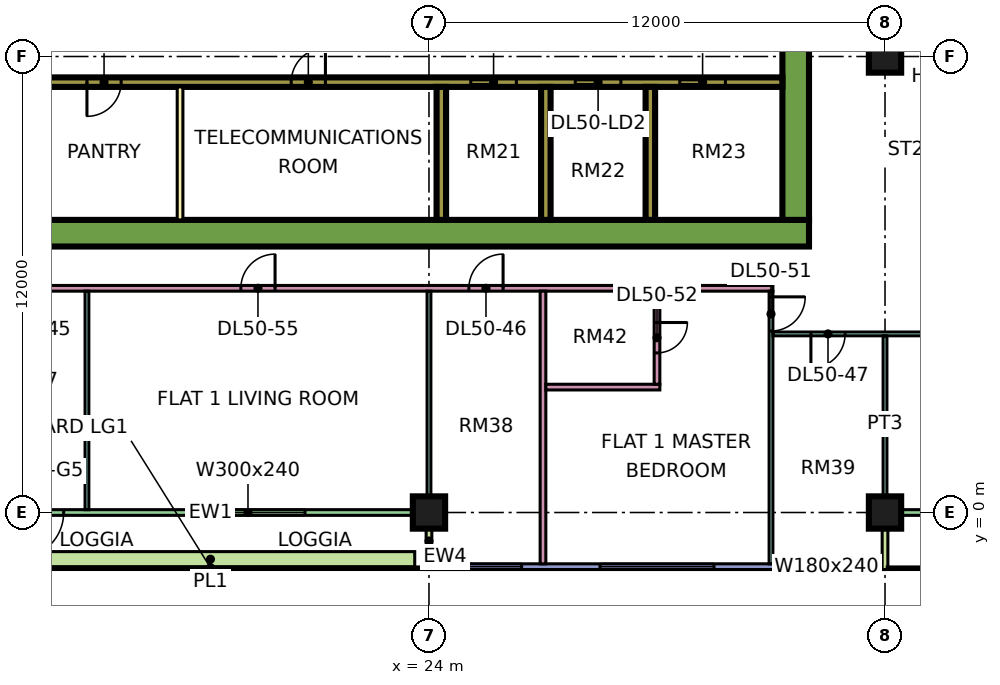
"""IFC4 building model, lengths in metres.
Left out: names, types, materials, properties, quantities, classifications, styles, units other than length and angle.
Written with IfcOpenShell. Run it as: python <this file> out.ifc"""

import sys

from ifc_helpers import new_model, si_unit, direction, frame, frame_2d, origin, origin_2d, place, context, subcontext, project, spatial, rectangle, extrude, element, fill, save


model = new_model("IFC4")
c1 = context("Model", 3, precision=1e-05, world=origin(), true_north=direction((0.0, 1.0)))
c2 = subcontext(c1, "Body", "Model", "MODEL_VIEW")
j1 = project(units=[si_unit("LENGTHUNIT", "METRE"), si_unit("PLANEANGLEUNIT", "RADIAN")], contexts=[c1])
p1 = place(None, origin())
s1 = spatial("IfcSite", under=j1, at=p1, CompositionType="ELEMENT")
p2 = place(p1, origin())
s2 = spatial("IfcBuilding", under=s1, at=p2, CompositionType="ELEMENT")
p3 = place(p2, frame((0.0, 0.0, 215.4)))
s3 = spatial("IfcBuildingStorey", under=s2, at=p3, CompositionType="ELEMENT", Elevation=215.4)
for number, where, z_axis, x_axis in (
    (1, (24.0, 0.0, 0.0), (0.0, 0.0, 1.0), (1.0, 0.0, 0.0)),
    (2, (36.0, 0.0, 0.0), (0.0, 0.0, 1.0), (1.0, 0.0, 0.0)),
    (3, (36.0, 12.0, 0.0), (0.0, 0.0, 1.0), (1.0, 0.0, 0.0)),
):
    element("IfcColumn", number, at=place(p3, frame(where, z_axis=z_axis, x_axis=x_axis)), inside=s3, PredefinedType="COLUMN", context=c2, shape_type="SweptSolid", body=[
        extrude(rectangle(XDim=0.85, YDim=0.85, at=origin_2d()), origin(), (0.0, 0.0, 1.0), 3.75),
    ])
p4 = place(p3, frame((9.0, 7.35, 0.0), z_axis=(0.0, 0.0, 1.0), x_axis=(1.0, 0.0, 0.0)))
e4 = element("IfcWall", 4, at=p4, inside=s3, PredefinedType="SHEAR", context=c2, shape_type="SweptSolid", body=[
    extrude(rectangle(XDim=25.0, YDim=0.7, at=frame_2d((12.5, 0.0))), origin(), (0.0, 0.0, 1.0), 3.75),
])
p5 = place(p3, frame((33.65, 7.7, 0.0), z_axis=(0.0, 0.0, 1.0), x_axis=(0.0, 1.0, 0.0)))
e5 = element("IfcWall", 5, at=p5, inside=s3, PredefinedType="SHEAR", context=c2, shape_type="SweptSolid", body=[
    extrude(rectangle(XDim=11.6, YDim=0.7, at=frame_2d((5.8, 0.0))), origin(), (0.0, 0.0, 1.0), 3.75),
])
p6 = place(p5, frame((5.5, 0.0, 0.0)))
e6 = element("IfcOpeningElement", 6, at=p6, cuts=e5, PredefinedType="OPENING", context=c2, shape_type="SweptSolid", body=[
    extrude(rectangle(XDim=1.8, YDim=2.4, at=frame_2d((0.9, 1.2))), frame((0.0, 0.36, 0.0), z_axis=(0.0, -1.0, 0.0), x_axis=(1.0, 0.0, 0.0)), (0.0, 0.0, 1.0), 0.72),
])
p7 = place(p3, frame((13.45, 11.325, 0.0), z_axis=(0.0, 0.0, 1.0), x_axis=(1.0, 0.0, 0.0)))
e7 = element("IfcWall", 7, at=p7, inside=s3, PredefinedType="SHEAR", context=c2, shape_type="SweptSolid", body=[
    extrude(rectangle(XDim=19.85, YDim=0.25, at=frame_2d((9.925, 0.0))), origin(), (0.0, 0.0, 1.0), 3.75),
])
p8 = place(p7, frame((11.65, 0.0, 0.0)))
e8 = element("IfcOpeningElement", 8, at=p8, cuts=e7, PredefinedType="OPENING", context=c2, shape_type="SweptSolid", body=[
    extrude(rectangle(XDim=1.2, YDim=2.2, at=frame_2d((0.6, 1.1))), frame((0.0, 0.135, 0.0), z_axis=(0.0, -1.0, 0.0), x_axis=(1.0, 0.0, 0.0)), (0.0, 0.0, 1.0), 0.27),
])
p9 = place(p7, frame((14.4, 0.0, 0.0)))
e9 = element("IfcOpeningElement", 9, at=p9, cuts=e7, PredefinedType="OPENING", context=c2, shape_type="SweptSolid", body=[
    extrude(rectangle(XDim=1.2, YDim=2.2, at=frame_2d((0.6, 1.1))), frame((0.0, 0.135, 0.0), z_axis=(0.0, -1.0, 0.0), x_axis=(1.0, 0.0, 0.0)), (0.0, 0.0, 1.0), 0.27),
])
p10 = place(p7, frame((17.15, 0.0, 0.0)))
e10 = element("IfcOpeningElement", 10, at=p10, cuts=e7, PredefinedType="OPENING", context=c2, shape_type="SweptSolid", body=[
    extrude(rectangle(XDim=1.2, YDim=2.2, at=frame_2d((0.6, 1.1))), frame((0.0, 0.135, 0.0), z_axis=(0.0, -1.0, 0.0), x_axis=(1.0, 0.0, 0.0)), (0.0, 0.0, 1.0), 0.27),
])
p11 = place(p7, frame((1.55, 0.0, 0.0)))
e11 = element("IfcOpeningElement", 11, at=p11, cuts=e7, PredefinedType="OPENING", context=c2, shape_type="SweptSolid", body=[
    extrude(rectangle(XDim=0.9, YDim=2.1, at=frame_2d((0.45, 1.05))), frame((0.0, 0.135, 0.0), z_axis=(0.0, -1.0, 0.0), x_axis=(1.0, 0.0, 0.0)), (0.0, 0.0, 1.0), 0.27),
])
p12 = place(p7, frame((6.925, 0.0, 0.0)))
e12 = element("IfcOpeningElement", 12, at=p12, cuts=e7, PredefinedType="OPENING", context=c2, shape_type="SweptSolid", body=[
    extrude(rectangle(XDim=0.9, YDim=2.1, at=frame_2d((0.45, 1.05))), frame((0.0, 0.135, 0.0), z_axis=(0.0, -1.0, 0.0), x_axis=(1.0, 0.0, 0.0)), (0.0, 0.0, 1.0), 0.27),
])
for number, where, z_axis, x_axis in (
    (13, (24.325, 7.7, 0.0), (0.0, 0.0, 1.0), (0.0, 1.0, 0.0)),
    (14, (27.075, 7.7, 0.0), (0.0, 0.0, 1.0), (0.0, 1.0, 0.0)),
    (15, (29.825, 7.7, 0.0), (0.0, 0.0, 1.0), (0.0, 1.0, 0.0)),
):
    element("IfcWall", number, at=place(p3, frame(where, z_axis=z_axis, x_axis=x_axis)), inside=s3, PredefinedType="SHEAR", context=c2, shape_type="SweptSolid", body=[
        extrude(rectangle(XDim=3.5, YDim=0.25, at=frame_2d((1.75, 0.0))), origin(), (0.0, 0.0, 1.0), 3.75),
    ])
p13 = place(p3, frame((12.575, 0.0, 0.0), z_axis=(0.0, 0.0, 1.0), x_axis=(1.0, 0.0, 0.0)))
e16 = element("IfcWall", 16, at=p13, inside=s3, PredefinedType="SOLIDWALL", context=c2, shape_type="SweptSolid", body=[
    extrude(rectangle(XDim=11.35, YDim=0.15, at=frame_2d((5.675, 0.0))), origin(), (0.0, 0.0, 1.0), 3.35),
])
p14 = place(p13, frame((0.613, 0.0, 0.0)))
e17 = element("IfcOpeningElement", 17, at=p14, cuts=e16, PredefinedType="OPENING", context=c2, shape_type="SweptSolid", body=[
    extrude(rectangle(XDim=1.2, YDim=2.4, at=frame_2d((0.6, 1.2))), frame((0.0, 0.085, 0.0), z_axis=(0.0, -1.0, 0.0), x_axis=(1.0, 0.0, 0.0)), (0.0, 0.0, 1.0), 0.17),
])
p15 = place(p13, frame((5.163, 0.0, 0.45)))
e18 = element("IfcOpeningElement", 18, at=p15, cuts=e16, PredefinedType="OPENING", context=c2, shape_type="SweptSolid", body=[
    extrude(rectangle(XDim=3.0, YDim=2.4, at=frame_2d((1.5, 1.2))), frame((0.0, 0.085, 0.0), z_axis=(0.0, -1.0, 0.0), x_axis=(1.0, 0.0, 0.0)), (0.0, 0.0, 1.0), 0.17),
])
p16 = place(p3, frame((24.0, -1.5, 0.0), z_axis=(0.0, 0.0, 1.0), x_axis=(0.0, 1.0, 0.0)))
e19 = element("IfcWall", 19, at=p16, inside=s3, PredefinedType="SOLIDWALL", context=c2, shape_type="SweptSolid", body=[
    extrude(rectangle(XDim=1.5, YDim=0.15, at=frame_2d((0.75, 0.0))), origin(), (0.0, 0.0, 1.0), 3.35),
])
p17 = place(p3, frame((24.075, -1.425, 0.0), z_axis=(0.0, 0.0, 1.0), x_axis=(1.0, 0.0, 0.0)))
e20 = element("IfcWall", 20, at=p17, inside=s3, PredefinedType="SOLIDWALL", context=c2, shape_type="SweptSolid", body=[
    extrude(rectangle(XDim=11.85, YDim=0.15, at=frame_2d((5.925, 0.0))), origin(), (0.0, 0.0, 1.0), 3.35),
])
p18 = place(p17, frame((0.562, 0.0, 0.45)))
e21 = element("IfcOpeningElement", 21, at=p18, cuts=e20, PredefinedType="OPENING", context=c2, shape_type="SweptSolid", body=[
    extrude(rectangle(XDim=1.8, YDim=2.4, at=frame_2d((0.9, 1.2))), frame((0.0, 0.085, 0.0), z_axis=(0.0, -1.0, 0.0), x_axis=(1.0, 0.0, 0.0)), (0.0, 0.0, 1.0), 0.17),
])
p19 = place(p17, frame((4.425, 0.0, 0.45)))
e22 = element("IfcOpeningElement", 22, at=p19, cuts=e20, PredefinedType="OPENING", context=c2, shape_type="SweptSolid", body=[
    extrude(rectangle(XDim=3.0, YDim=2.4, at=frame_2d((1.5, 1.2))), frame((0.0, 0.085, 0.0), z_axis=(0.0, -1.0, 0.0), x_axis=(1.0, 0.0, 0.0)), (0.0, 0.0, 1.0), 0.17),
])
p20 = place(p17, frame((9.488, 0.0, 0.45)))
e23 = element("IfcOpeningElement", 23, at=p20, cuts=e20, PredefinedType="OPENING", context=c2, shape_type="SweptSolid", body=[
    extrude(rectangle(XDim=1.8, YDim=2.4, at=frame_2d((0.9, 1.2))), frame((0.0, 0.085, 0.0), z_axis=(0.0, -1.0, 0.0), x_axis=(1.0, 0.0, 0.0)), (0.0, 0.0, 1.0), 0.17),
])
p21 = place(p3, frame((36.075, 0.0, 0.0), z_axis=(0.0, 0.0, 1.0), x_axis=(1.0, 0.0, 0.0)))
e24 = element("IfcWall", 24, at=p21, inside=s3, PredefinedType="SOLIDWALL", context=c2, shape_type="SweptSolid", body=[
    extrude(rectangle(XDim=11.85, YDim=0.15, at=frame_2d((5.925, 0.0))), origin(), (0.0, 0.0, 1.0), 3.35),
])
p22 = place(p21, frame((3.525, 0.0, 0.0)))
e25 = element("IfcOpeningElement", 25, at=p22, cuts=e24, PredefinedType="OPENING", context=c2, shape_type="SweptSolid", body=[
    extrude(rectangle(XDim=1.8, YDim=2.4, at=frame_2d((0.9, 1.2))), frame((0.0, 0.085, 0.0), z_axis=(0.0, -1.0, 0.0), x_axis=(1.0, 0.0, 0.0)), (0.0, 0.0, 1.0), 0.17),
])
p23 = place(p21, frame((10.05, 0.0, 0.45)))
e26 = element("IfcOpeningElement", 26, at=p23, cuts=e24, PredefinedType="OPENING", context=c2, shape_type="SweptSolid", body=[
    extrude(rectangle(XDim=1.2, YDim=2.4, at=frame_2d((0.6, 1.2))), frame((0.0, 0.085, 0.0), z_axis=(0.0, -1.0, 0.0), x_axis=(1.0, 0.0, 0.0)), (0.0, 0.0, 1.0), 0.17),
])
p24 = place(p3, frame((36.0, -1.5, 0.0), z_axis=(0.0, 0.0, 1.0), x_axis=(0.0, 1.0, 0.0)))
e27 = element("IfcWall", 27, at=p24, inside=s3, PredefinedType="SOLIDWALL", context=c2, shape_type="SweptSolid", body=[
    extrude(rectangle(XDim=1.5, YDim=0.15, at=frame_2d((0.75, 0.0))), origin(), (0.0, 0.0, 1.0), 3.35),
])
p25 = place(p3, frame((12.875, -1.229, 0.0), z_axis=(0.0, 0.0, 1.0), x_axis=(1.0, 0.0, 0.0)))
e28 = element("IfcWall", 28, at=p25, inside=s3, PredefinedType="SOLIDWALL", context=c2, shape_type="SweptSolid", body=[
    extrude(rectangle(XDim=10.75, YDim=0.4, at=frame_2d((5.375, 0.0))), origin(), (0.0, 0.0, 1.0), 0.7),
])
p26 = place(p3, frame((17.45, 7.7, 0.0), z_axis=(0.0, 0.0, 1.0), x_axis=(0.0, 1.0, 0.0)))
e29 = element("IfcWall", 29, at=p26, inside=s3, PredefinedType="PARTITIONING", context=c2, shape_type="SweptSolid", body=[
    extrude(rectangle(XDim=3.5, YDim=0.15, at=frame_2d((1.75, 0.0))), origin(), (0.0, 0.0, 1.0), 3.35),
])
p27 = place(p3, frame((11.95, 5.9, 0.0), z_axis=(0.0, 0.0, 1.0), x_axis=(1.0, 0.0, 0.0)))
e30 = element("IfcWall", 30, at=p27, inside=s3, PredefinedType="PARTITIONING", context=c2, shape_type="SweptSolid", body=[
    extrude(rectangle(XDim=21.1, YDim=0.15, at=frame_2d((10.55, 0.0))), origin(), (0.0, 0.0, 1.0), 3.35),
])
p28 = place(p27, frame((1.1, 0.0, 0.0)))
e31 = element("IfcOpeningElement", 31, at=p28, cuts=e30, PredefinedType="OPENING", context=c2, shape_type="SweptSolid", body=[
    extrude(rectangle(XDim=0.9, YDim=2.1, at=frame_2d((0.45, 1.05))), frame((0.0, 0.085, 0.0), z_axis=(0.0, -1.0, 0.0), x_axis=(1.0, 0.0, 0.0)), (0.0, 0.0, 1.0), 0.17),
])
p29 = place(p27, frame((13.1, 0.0, 0.0)))
e32 = element("IfcOpeningElement", 32, at=p29, cuts=e30, PredefinedType="OPENING", context=c2, shape_type="SweptSolid", body=[
    extrude(rectangle(XDim=0.9, YDim=2.1, at=frame_2d((0.45, 1.05))), frame((0.0, 0.085, 0.0), z_axis=(0.0, -1.0, 0.0), x_axis=(1.0, 0.0, 0.0)), (0.0, 0.0, 1.0), 0.17),
])
p30 = place(p27, frame((7.1, 0.0, 0.0)))
e33 = element("IfcOpeningElement", 33, at=p30, cuts=e30, PredefinedType="OPENING", context=c2, shape_type="SweptSolid", body=[
    extrude(rectangle(XDim=0.9, YDim=2.1, at=frame_2d((0.45, 1.05))), frame((0.0, 0.085, 0.0), z_axis=(0.0, -1.0, 0.0), x_axis=(1.0, 0.0, 0.0)), (0.0, 0.0, 1.0), 0.17),
])
p31 = place(p3, frame((15.0, 0.074, 0.0), z_axis=(0.0, 0.0, 1.0), x_axis=(0.0, 1.0, 0.0)))
e34 = element("IfcWall", 34, at=p31, inside=s3, PredefinedType="PARTITIONING", context=c2, shape_type="SweptSolid", body=[
    extrude(rectangle(XDim=5.751, YDim=0.1, at=frame_2d((2.875, 0.0))), origin(), (0.0, 0.0, 1.0), 3.35),
])
p32 = place(p3, frame((24.0, 0.0, 0.0), z_axis=(0.0, 0.0, 1.0), x_axis=(0.0, 1.0, 0.0)))
e35 = element("IfcWall", 35, at=p32, inside=s3, PredefinedType="PARTITIONING", context=c2, shape_type="SweptSolid", body=[
    extrude(rectangle(XDim=5.825, YDim=0.1, at=frame_2d((2.913, 0.0))), origin(), (0.0, 0.0, 1.0), 3.35),
])
p33 = place(p3, frame((27.0, -1.351, 0.0), z_axis=(0.0, 0.0, 1.0), x_axis=(0.0, 1.0, 0.0)))
e36 = element("IfcWall", 36, at=p33, inside=s3, PredefinedType="PARTITIONING", context=c2, shape_type="SweptSolid", body=[
    extrude(rectangle(XDim=7.176, YDim=0.15, at=frame_2d((3.588, 0.0))), origin(), (0.0, 0.0, 1.0), 3.35),
])
p34 = place(p3, frame((27.075, 3.3, 0.0), z_axis=(0.0, 0.0, 1.0), x_axis=(1.0, 0.0, 0.0)))
e37 = element("IfcWall", 37, at=p34, inside=s3, PredefinedType="PARTITIONING", context=c2, shape_type="SweptSolid", body=[
    extrude(rectangle(XDim=3.0, YDim=0.15, at=frame_2d((1.5, 0.0))), origin(), (0.0, 0.0, 1.0), 3.35),
])
p35 = place(p3, frame((30.0, 3.375, 0.0), z_axis=(0.0, 0.0, 1.0), x_axis=(0.0, 1.0, 0.0)))
e38 = element("IfcWall", 38, at=p35, inside=s3, PredefinedType="PARTITIONING", context=c2, shape_type="SweptSolid", body=[
    extrude(rectangle(XDim=2.45, YDim=0.15, at=frame_2d((1.225, 0.0))), origin(), (0.0, 0.0, 1.0), 3.35),
])
p36 = place(p35, frame((0.825, 0.0, 0.0)))
e39 = element("IfcOpeningElement", 39, at=p36, cuts=e38, PredefinedType="OPENING", context=c2, shape_type="SweptSolid", body=[
    extrude(rectangle(XDim=0.8, YDim=2.1, at=frame_2d((0.4, 1.05))), frame((0.0, 0.085, 0.0), z_axis=(0.0, -1.0, 0.0), x_axis=(1.0, 0.0, 0.0)), (0.0, 0.0, 1.0), 0.17),
])
p37 = place(p3, frame((33.0, -1.351, 0.0), z_axis=(0.0, 0.0, 1.0), x_axis=(0.0, 1.0, 0.0)))
e40 = element("IfcWall", 40, at=p37, inside=s3, PredefinedType="PARTITIONING", context=c2, shape_type="SweptSolid", body=[
    extrude(rectangle(XDim=7.176, YDim=0.1, at=frame_2d((3.588, 0.0))), origin(), (0.0, 0.0, 1.0), 3.35),
])
p38 = place(p37, frame((6.126, 0.0, 0.0)))
e41 = element("IfcOpeningElement", 41, at=p38, cuts=e40, PredefinedType="OPENING", context=c2, shape_type="SweptSolid", body=[
    extrude(rectangle(XDim=0.9, YDim=2.1, at=frame_2d((0.45, 1.05))), frame((0.0, 0.06, 0.0), z_axis=(0.0, -1.0, 0.0), x_axis=(1.0, 0.0, 0.0)), (0.0, 0.0, 1.0), 0.12),
])
p39 = place(p3, frame((33.05, 4.7, 0.0), z_axis=(0.0, 0.0, 1.0), x_axis=(1.0, 0.0, 0.0)))
e42 = element("IfcWall", 42, at=p39, inside=s3, PredefinedType="PARTITIONING", context=c2, shape_type="SweptSolid", body=[
    extrude(rectangle(XDim=14.85, YDim=0.1, at=frame_2d((7.425, 0.0))), origin(), (0.0, 0.0, 1.0), 3.35),
])
p40 = place(p39, frame((1.0, 0.0, 0.0)))
e43 = element("IfcOpeningElement", 43, at=p40, cuts=e42, PredefinedType="OPENING", context=c2, shape_type="SweptSolid", body=[
    extrude(rectangle(XDim=0.9, YDim=2.1, at=frame_2d((0.45, 1.05))), frame((0.0, 0.06, 0.0), z_axis=(0.0, -1.0, 0.0), x_axis=(1.0, 0.0, 0.0)), (0.0, 0.0, 1.0), 0.12),
])
p41 = place(p39, frame((13.0, 0.0, 0.0)))
e44 = element("IfcOpeningElement", 44, at=p41, cuts=e42, PredefinedType="OPENING", context=c2, shape_type="SweptSolid", body=[
    extrude(rectangle(XDim=0.9, YDim=2.1, at=frame_2d((0.45, 1.05))), frame((0.0, 0.06, 0.0), z_axis=(0.0, -1.0, 0.0), x_axis=(1.0, 0.0, 0.0)), (0.0, 0.0, 1.0), 0.12),
])
p42 = place(p39, frame((7.0, 0.0, 0.0)))
e45 = element("IfcOpeningElement", 45, at=p42, cuts=e42, PredefinedType="OPENING", context=c2, shape_type="SweptSolid", body=[
    extrude(rectangle(XDim=0.9, YDim=2.1, at=frame_2d((0.45, 1.05))), frame((0.0, 0.06, 0.0), z_axis=(0.0, -1.0, 0.0), x_axis=(1.0, 0.0, 0.0)), (0.0, 0.0, 1.0), 0.12),
])
p43 = place(p3, frame((36.0, 0.0, 0.0), z_axis=(0.0, 0.0, 1.0), x_axis=(0.0, 1.0, 0.0)))
e46 = element("IfcWall", 46, at=p43, inside=s3, PredefinedType="PARTITIONING", context=c2, shape_type="SweptSolid", body=[
    extrude(rectangle(XDim=4.65, YDim=0.1, at=frame_2d((2.325, 0.0))), origin(), (0.0, 0.0, 1.0), 3.35),
])
p44 = place(p14, frame((1.2, 0.0, 0.0), z_axis=(0.0, 0.0, 1.0), x_axis=(-1.0, 0.0, 0.0)))
e47 = element("IfcDoor", 47, at=p44, inside=s3, OperationType="DOUBLE_DOOR_SINGLE_SWING", PredefinedType="DOOR", context=c2, shape_type="SweptSolid", body=[
    extrude(rectangle(XDim=1.2, YDim=2.4, at=frame_2d((0.6, 1.2))), frame((0.0, 0.025, 0.0), z_axis=(0.0, -1.0, 0.0), x_axis=(1.0, 0.0, 0.0)), (0.0, 0.0, 1.0), 0.05),
])
fill(e17, e47)
p45 = place(p15, origin())
e48 = element("IfcWindow", 48, at=p45, inside=s3, PartitioningType="SINGLE_PANEL", PredefinedType="WINDOW", context=c2, shape_type="SweptSolid", body=[
    extrude(rectangle(XDim=3.0, YDim=2.4, at=frame_2d((1.5, 1.2))), frame((0.0, 0.03, 0.0), z_axis=(0.0, -1.0, 0.0), x_axis=(1.0, 0.0, 0.0)), (0.0, 0.0, 1.0), 0.06),
])
fill(e18, e48)
p46 = place(p18, origin())
e49 = element("IfcWindow", 49, at=p46, inside=s3, PartitioningType="SINGLE_PANEL", PredefinedType="WINDOW", context=c2, shape_type="SweptSolid", body=[
    extrude(rectangle(XDim=1.8, YDim=2.4, at=frame_2d((0.9, 1.2))), frame((0.0, 0.03, 0.0), z_axis=(0.0, -1.0, 0.0), x_axis=(1.0, 0.0, 0.0)), (0.0, 0.0, 1.0), 0.06),
])
fill(e21, e49)
p47 = place(p19, origin())
e50 = element("IfcWindow", 50, at=p47, inside=s3, PartitioningType="SINGLE_PANEL", PredefinedType="WINDOW", context=c2, shape_type="SweptSolid", body=[
    extrude(rectangle(XDim=3.0, YDim=2.4, at=frame_2d((1.5, 1.2))), frame((0.0, 0.03, 0.0), z_axis=(0.0, -1.0, 0.0), x_axis=(1.0, 0.0, 0.0)), (0.0, 0.0, 1.0), 0.06),
])
fill(e22, e50)
p48 = place(p20, origin())
e51 = element("IfcWindow", 51, at=p48, inside=s3, PartitioningType="SINGLE_PANEL", PredefinedType="WINDOW", context=c2, shape_type="SweptSolid", body=[
    extrude(rectangle(XDim=1.8, YDim=2.4, at=frame_2d((0.9, 1.2))), frame((0.0, 0.03, 0.0), z_axis=(0.0, -1.0, 0.0), x_axis=(1.0, 0.0, 0.0)), (0.0, 0.0, 1.0), 0.06),
])
fill(e23, e51)
p49 = place(p8, origin())
e52 = element("IfcDoor", 52, at=p49, inside=s3, OperationType="DOUBLE_DOOR_SLIDING", PredefinedType="DOOR", context=c2, shape_type="SweptSolid", body=[
    extrude(rectangle(XDim=1.2, YDim=2.2, at=frame_2d((0.6, 1.1))), frame((0.0, 0.025, 0.0), z_axis=(0.0, -1.0, 0.0), x_axis=(1.0, 0.0, 0.0)), (0.0, 0.0, 1.0), 0.05),
])
fill(e8, e52)
p50 = place(p9, origin())
e53 = element("IfcDoor", 53, at=p50, inside=s3, OperationType="DOUBLE_DOOR_SLIDING", PredefinedType="DOOR", context=c2, shape_type="SweptSolid", body=[
    extrude(rectangle(XDim=1.2, YDim=2.2, at=frame_2d((0.6, 1.1))), frame((0.0, 0.025, 0.0), z_axis=(0.0, -1.0, 0.0), x_axis=(1.0, 0.0, 0.0)), (0.0, 0.0, 1.0), 0.05),
])
fill(e9, e53)
p51 = place(p10, origin())
e54 = element("IfcDoor", 54, at=p51, inside=s3, OperationType="DOUBLE_DOOR_SLIDING", PredefinedType="DOOR", context=c2, shape_type="SweptSolid", body=[
    extrude(rectangle(XDim=1.2, YDim=2.2, at=frame_2d((0.6, 1.1))), frame((0.0, 0.025, 0.0), z_axis=(0.0, -1.0, 0.0), x_axis=(1.0, 0.0, 0.0)), (0.0, 0.0, 1.0), 0.05),
])
fill(e10, e54)
p52 = place(p11, frame((0.9, 0.0, 0.0), z_axis=(0.0, 0.0, 1.0), x_axis=(-1.0, 0.0, 0.0)))
e55 = element("IfcDoor", 55, at=p52, inside=s3, OperationType="SINGLE_SWING_LEFT", PredefinedType="DOOR", context=c2, shape_type="SweptSolid", body=[
    extrude(rectangle(XDim=0.9, YDim=2.1, at=frame_2d((0.45, 1.05))), frame((0.0, 0.025, 0.0), z_axis=(0.0, -1.0, 0.0), x_axis=(1.0, 0.0, 0.0)), (0.0, 0.0, 1.0), 0.05),
])
fill(e11, e55)
p53 = place(p12, frame((0.9, 0.0, 0.0), z_axis=(0.0, 0.0, 1.0), x_axis=(-1.0, 0.0, 0.0)))
e56 = element("IfcDoor", 56, at=p53, inside=s3, OperationType="SINGLE_SWING_RIGHT", PredefinedType="DOOR", context=c2, shape_type="SweptSolid", body=[
    extrude(rectangle(XDim=0.9, YDim=2.1, at=frame_2d((0.45, 1.05))), frame((0.0, 0.025, 0.0), z_axis=(0.0, -1.0, 0.0), x_axis=(1.0, 0.0, 0.0)), (0.0, 0.0, 1.0), 0.05),
])
fill(e12, e56)
p54 = place(p29, frame((0.9, 0.0, 0.0), z_axis=(0.0, 0.0, 1.0), x_axis=(-1.0, 0.0, 0.0)))
e57 = element("IfcDoor", 57, at=p54, inside=s3, OperationType="SINGLE_SWING_RIGHT", PredefinedType="DOOR", context=c2, shape_type="SweptSolid", body=[
    extrude(rectangle(XDim=0.9, YDim=2.1, at=frame_2d((0.45, 1.05))), frame((0.0, 0.025, 0.0), z_axis=(0.0, -1.0, 0.0), x_axis=(1.0, 0.0, 0.0)), (0.0, 0.0, 1.0), 0.05),
])
fill(e32, e57)
p55 = place(p40, frame((0.9, 0.0, 0.0), z_axis=(0.0, 0.0, 1.0), x_axis=(-1.0, 0.0, 0.0)))
e58 = element("IfcDoor", 58, at=p55, inside=s3, OperationType="SINGLE_SWING_LEFT", PredefinedType="DOOR", context=c2, shape_type="SweptSolid", body=[
    extrude(rectangle(XDim=0.9, YDim=2.1, at=frame_2d((0.45, 1.05))), frame((0.0, 0.025, 0.0), z_axis=(0.0, -1.0, 0.0), x_axis=(1.0, 0.0, 0.0)), (0.0, 0.0, 1.0), 0.05),
])
fill(e43, e58)
p56 = place(p38, origin())
e59 = element("IfcDoor", 59, at=p56, inside=s3, OperationType="SINGLE_SWING_RIGHT", PredefinedType="DOOR", context=c2, shape_type="SweptSolid", body=[
    extrude(rectangle(XDim=0.9, YDim=2.1, at=frame_2d((0.45, 1.05))), frame((0.0, 0.025, 0.0), z_axis=(0.0, -1.0, 0.0), x_axis=(1.0, 0.0, 0.0)), (0.0, 0.0, 1.0), 0.05),
])
fill(e41, e59)
p57 = place(p36, origin())
e60 = element("IfcDoor", 60, at=p57, inside=s3, OperationType="SINGLE_SWING_RIGHT", PredefinedType="DOOR", context=c2, shape_type="SweptSolid", body=[
    extrude(rectangle(XDim=0.8, YDim=2.1, at=frame_2d((0.4, 1.05))), frame((0.0, 0.025, 0.0), z_axis=(0.0, -1.0, 0.0), x_axis=(1.0, 0.0, 0.0)), (0.0, 0.0, 1.0), 0.05),
])
fill(e39, e60)
p58 = place(p30, frame((0.9, 0.0, 0.0), z_axis=(0.0, 0.0, 1.0), x_axis=(-1.0, 0.0, 0.0)))
e61 = element("IfcDoor", 61, at=p58, inside=s3, OperationType="SINGLE_SWING_RIGHT", PredefinedType="DOOR", context=c2, shape_type="SweptSolid", body=[
    extrude(rectangle(XDim=0.9, YDim=2.1, at=frame_2d((0.45, 1.05))), frame((0.0, 0.025, 0.0), z_axis=(0.0, -1.0, 0.0), x_axis=(1.0, 0.0, 0.0)), (0.0, 0.0, 1.0), 0.05),
])
fill(e33, e61)
save(model, sys.argv[1])
